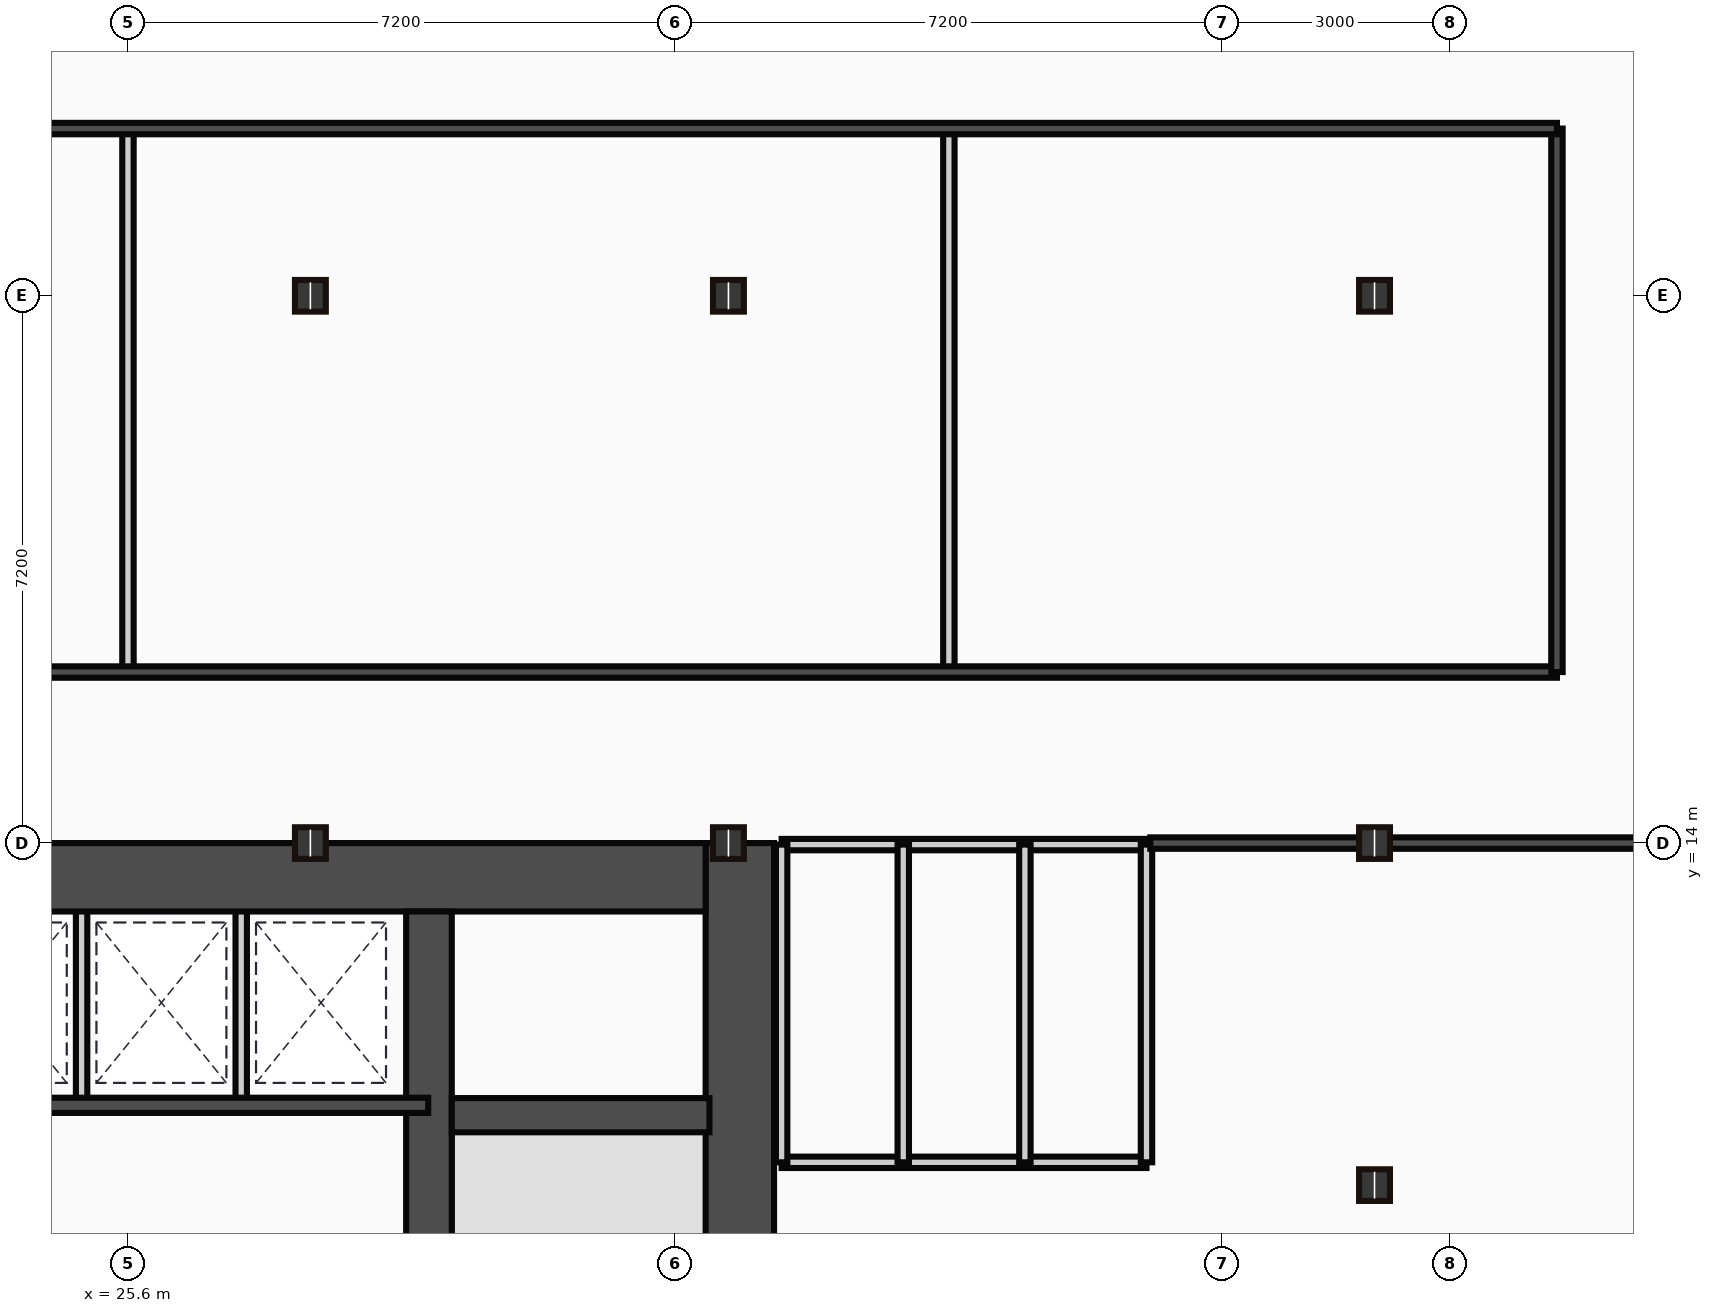
"""IFC4 building model, lengths in metres.
Left out: names, types, materials, properties, quantities, classifications, styles, units other than length and angle.
Written with IfcOpenShell. Run it as: python <this file> out.ifc"""

import sys

from ifc_helpers import new_model, si_unit, direction, frame, frame_2d, origin, origin_2d, place, context, subcontext, project, spatial, rectangle, i_section, extrude, source, transform, mapped, element, fill, save


model = new_model("IFC4")
c1 = context("Model", 3, precision=1e-05, world=origin(), true_north=direction((0.0, 1.0)))
c2 = subcontext(c1, "Body", "Model", "MODEL_VIEW")
j1 = project(units=[si_unit("LENGTHUNIT", "METRE"), si_unit("PLANEANGLEUNIT", "RADIAN")], contexts=[c1])
p1 = place(None, origin())
s1 = spatial("IfcSite", under=j1, at=p1, CompositionType="ELEMENT")
p2 = place(p1, origin())
s2 = spatial("IfcBuilding", under=s1, at=p2, CompositionType="ELEMENT")
p3 = place(p2, frame((0.0, 0.0, 32.5)))
s3 = spatial("IfcBuildingStorey", under=s2, at=p3, CompositionType="ELEMENT", Elevation=32.5)
m1 = source(origin(), c2, "Body", "SweptSolid", [
    extrude(rectangle(XDim=13.1, YDim=0.9, at=frame_2d((6.55, 0.0))), origin(), (0.0, 0.0, 1.0), 3.65),
])
p4 = place(p3, frame((33.65, 0.9, 0.0), z_axis=(0.0, 0.0, 1.0), x_axis=(0.0, 1.0, 0.0)))
e1 = element("IfcWall", 1, at=p4, inside=s3, PredefinedType="SHEAR", context=c2, shape_type="MappedRepresentation", body=[
    mapped(m1, transform((0.0, 0.0, 0.0))),
])
m2 = source(origin(), c2, "Body", "SweptSolid", [
    extrude(rectangle(XDim=12.6, YDim=0.9, at=frame_2d((6.3, 0.0))), origin(), (0.0, 0.0, 1.0), 3.65),
])
p5 = place(p3, frame((20.6, 13.55, 0.0), z_axis=(0.0, 0.0, 1.0), x_axis=(1.0, 0.0, 0.0)))
e2 = element("IfcWall", 2, at=p5, inside=s3, PredefinedType="SHEAR", context=c2, shape_type="MappedRepresentation", body=[
    mapped(m2, transform((0.0, 0.0, 0.0))),
])
p6 = place(p5, frame((9.25, 0.0, 0.0)))
e3 = element("IfcOpeningElement", 3, at=p6, cuts=e2, PredefinedType="OPENING", context=c2, shape_type="SweptSolid", body=[
    extrude(rectangle(XDim=1.1, YDim=2.15, at=frame_2d((0.55, 1.075))), frame((0.0, 0.46, 0.0), z_axis=(0.0, -1.0, 0.0), x_axis=(1.0, 0.0, 0.0)), (0.0, 0.0, 1.0), 0.92),
])
m3 = source(origin(), c2, "Body", "SweptSolid", [
    extrude(rectangle(XDim=12.2, YDim=0.6, at=frame_2d((6.1, 0.0))), origin(), (0.0, 0.0, 1.0), 3.65),
])
p7 = place(p3, frame((29.56, 0.9, 0.0), z_axis=(0.0, 0.0, 1.0), x_axis=(0.0, 1.0, 0.0)))
e4 = element("IfcWall", 4, at=p7, inside=s3, PredefinedType="SHEAR", context=c2, shape_type="MappedRepresentation", body=[
    mapped(m3, transform((0.0, 0.0, 0.0))),
])
m4 = source(origin(), c2, "Body", "SweptSolid", [
    extrude(rectangle(XDim=3.39, YDim=0.45, at=frame_2d((1.695, 0.0))), origin(), (0.0, 0.0, 1.0), 3.65),
])
p8 = place(p3, frame((29.86, 10.42, 0.0), z_axis=(0.0, 0.0, 1.0), x_axis=(1.0, 0.0, 0.0)))
e5 = element("IfcWall", 5, at=p8, inside=s3, PredefinedType="SHEAR", context=c2, shape_type="MappedRepresentation", body=[
    mapped(m4, transform((0.0, 0.0, 0.0))),
])
p9 = place(p8, frame((1.1, 0.0, 0.0)))
e6 = element("IfcOpeningElement", 6, at=p9, cuts=e5, PredefinedType="OPENING", context=c2, shape_type="SweptSolid", body=[
    extrude(rectangle(XDim=1.1, YDim=2.15, at=frame_2d((0.55, 1.075))), frame((0.0, 0.235, 0.0), z_axis=(0.0, -1.0, 0.0), x_axis=(1.0, 0.0, 0.0)), (0.0, 0.0, 1.0), 0.47),
])
m5 = source(origin(), c2, "Body", "SweptSolid", [
    extrude(i_section(OverallWidth=0.406, OverallDepth=0.416, WebThickness=0.03, FlangeThickness=0.048, at=origin_2d()), origin(), (0.0, 0.0, 1.0), 3.65),
])
for number, where, z_axis, x_axis in (
    (7, (28.0, 14.0, 0.0), (0.0, 0.0, 1.0), (1.0, 0.0, 0.0)),
    (8, (28.0, 21.2, 0.0), (0.0, 0.0, 1.0), (1.0, 0.0, 0.0)),
    (9, (33.5, 14.0, 0.0), (0.0, 0.0, 1.0), (1.0, 0.0, 0.0)),
    (10, (33.5, 21.2, 0.0), (0.0, 0.0, 1.0), (1.0, 0.0, 0.0)),
    (11, (42.0, 9.5, 0.0), (0.0, 0.0, 1.0), (1.0, 0.0, 0.0)),
    (12, (42.0, 14.0, 0.0), (0.0, 0.0, 1.0), (1.0, 0.0, 0.0)),
    (13, (42.0, 21.2, 0.0), (0.0, 0.0, 1.0), (1.0, 0.0, 0.0)),
):
    element("IfcColumn", number, at=place(p3, frame(where, z_axis=z_axis, x_axis=x_axis)), inside=s3, PredefinedType="COLUMN", context=c2, shape_type="MappedRepresentation", body=[
        mapped(m5, transform((0.0, 0.0, 0.0))),
    ])
m6 = source(origin(), c2, "Body", "SweptSolid", [
    extrude(rectangle(XDim=8.8, YDim=0.2, at=frame_2d((4.4, 0.0))), origin(), (0.0, 0.0, 1.0), 3.4),
])
p10 = place(p3, frame((20.75, 10.55, 0.0), z_axis=(0.0, 0.0, 1.0), x_axis=(1.0, 0.0, 0.0)))
e14 = element("IfcWall", 14, at=p10, inside=s3, PredefinedType="PARTITIONING", context=c2, shape_type="MappedRepresentation", body=[
    mapped(m6, transform((0.0, 0.0, 0.0))),
])
m7 = source(origin(), c2, "Body", "SweptSolid", [
    extrude(rectangle(XDim=2.85, YDim=0.15, at=frame_2d((1.425, 0.0))), origin(), (0.0, 0.0, 1.0), 3.4),
])
for number, where, z_axis, x_axis in (
    (15, (24.99, 10.6, 0.0), (0.0, 0.0, 1.0), (0.0, 1.0, 0.0)),
    (16, (27.09, 10.6, 0.0), (0.0, 0.0, 1.0), (0.0, 1.0, 0.0)),
):
    element("IfcWall", number, at=place(p3, frame(where, z_axis=z_axis, x_axis=x_axis)), inside=s3, PredefinedType="PARTITIONING", context=c2, shape_type="MappedRepresentation", body=[
        mapped(m7, transform((0.0, 0.0, 0.0))),
    ])
m8 = source(origin(), c2, "Body", "SweptSolid", [
    extrude(rectangle(XDim=4.8, YDim=0.15, at=frame_2d((2.4, 0.0))), origin(), (0.0, 0.0, 1.0), 2.625),
])
p11 = place(p3, frame((34.2, 13.98, 0.0), z_axis=(0.0, 0.0, 1.0), x_axis=(1.0, 0.0, 0.0)))
e17 = element("IfcWall", 17, at=p11, inside=s3, PredefinedType="PARTITIONING", context=c2, shape_type="MappedRepresentation", body=[
    mapped(m8, transform((0.0, 0.0, 0.0))),
])
p12 = place(p11, frame((0.35, 0.0, 0.0)))
e18 = element("IfcOpeningElement", 18, at=p12, cuts=e17, PredefinedType="OPENING", context=c2, shape_type="SweptSolid", body=[
    extrude(rectangle(XDim=0.85, YDim=2.1, at=frame_2d((0.425, 1.05))), frame((0.0, 0.085, 0.0), z_axis=(0.0, -1.0, 0.0), x_axis=(1.0, 0.0, 0.0)), (0.0, 0.0, 1.0), 0.17),
])
p13 = place(p11, frame((1.95, 0.0, 0.0)))
e19 = element("IfcOpeningElement", 19, at=p13, cuts=e17, PredefinedType="OPENING", context=c2, shape_type="SweptSolid", body=[
    extrude(rectangle(XDim=0.85, YDim=2.1, at=frame_2d((0.425, 1.05))), frame((0.0, 0.085, 0.0), z_axis=(0.0, -1.0, 0.0), x_axis=(1.0, 0.0, 0.0)), (0.0, 0.0, 1.0), 0.17),
])
p14 = place(p11, frame((3.5, 0.0, 0.0)))
e20 = element("IfcOpeningElement", 20, at=p14, cuts=e17, PredefinedType="OPENING", context=c2, shape_type="SweptSolid", body=[
    extrude(rectangle(XDim=0.9, YDim=2.1, at=frame_2d((0.45, 1.05))), frame((0.0, 0.085, 0.0), z_axis=(0.0, -1.0, 0.0), x_axis=(1.0, 0.0, 0.0)), (0.0, 0.0, 1.0), 0.17),
])
m9 = source(origin(), c2, "Body", "SweptSolid", [
    extrude(rectangle(XDim=4.8, YDim=0.15, at=frame_2d((2.4, 0.0))), origin(), (0.0, 0.0, 1.0), 3.4),
])
p15 = place(p3, frame((34.2, 9.8, 0.0), z_axis=(0.0, 0.0, 1.0), x_axis=(1.0, 0.0, 0.0)))
e21 = element("IfcWall", 21, at=p15, inside=s3, PredefinedType="PARTITIONING", context=c2, shape_type="MappedRepresentation", body=[
    mapped(m9, transform((0.0, 0.0, 0.0))),
])
m10 = source(origin(), c2, "Body", "SweptSolid", [
    extrude(rectangle(XDim=4.18, YDim=0.15, at=frame_2d((2.09, 0.0))), origin(), (0.0, 0.0, 1.0), 3.4),
])
for number, where, z_axis, x_axis in (
    (22, (39.0, 9.8, 0.0), (0.0, 0.0, 1.0), (0.0, 1.0, 0.0)),
    (23, (34.2, 9.8, 0.0), (0.0, 0.0, 1.0), (0.0, 1.0, 0.0)),
    (24, (35.8, 9.8, 0.0), (0.0, 0.0, 1.0), (0.0, 1.0, 0.0)),
    (25, (37.4, 9.8, 0.0), (0.0, 0.0, 1.0), (0.0, 1.0, 0.0)),
):
    element("IfcWall", number, at=place(p3, frame(where, z_axis=z_axis, x_axis=x_axis)), inside=s3, PredefinedType="PARTITIONING", context=c2, shape_type="MappedRepresentation", body=[
        mapped(m10, transform((0.0, 0.0, 0.0))),
    ])
m11 = source(origin(), c2, "Body", "SweptSolid", [
    extrude(rectangle(XDim=7.75, YDim=0.15, at=frame_2d((3.875, 0.0))), origin(), (0.0, 0.0, 1.0), 2.625),
])
p16 = place(p3, frame((46.8, 14.0, 0.0), z_axis=(0.0, 0.0, 1.0), x_axis=(-1.0, 0.0, 0.0)))
e26 = element("IfcWall", 26, at=p16, inside=s3, PredefinedType="PARTITIONING", context=c2, shape_type="MappedRepresentation", body=[
    mapped(m11, transform((0.0, 0.0, 0.0))),
])
p17 = place(p16, frame((2.226, 0.0, 0.0)))
e27 = element("IfcOpeningElement", 27, at=p17, cuts=e26, PredefinedType="OPENING", context=c2, shape_type="SweptSolid", body=[
    extrude(rectangle(XDim=0.95, YDim=2.15, at=frame_2d((0.475, 1.075))), frame((0.0, 0.085, 0.0), z_axis=(0.0, -1.0, 0.0), x_axis=(1.0, 0.0, 0.0)), (0.0, 0.0, 1.0), 0.17),
])
m12 = source(origin(), c2, "Body", "SweptSolid", [
    extrude(rectangle(XDim=38.8, YDim=0.15, at=frame_2d((19.4, 0.0))), origin(), (0.0, 0.0, 1.0), 3.4),
])
p18 = place(p3, frame((5.6, 16.25, 0.0), z_axis=(0.0, 0.0, 1.0), x_axis=(1.0, 0.0, 0.0)))
e28 = element("IfcWall", 28, at=p18, inside=s3, PredefinedType="PARTITIONING", context=c2, shape_type="MappedRepresentation", body=[
    mapped(m12, transform((0.0, 0.0, 0.0))),
])
p19 = place(p18, frame((4.255, 0.0, 0.0)))
e29 = element("IfcOpeningElement", 29, at=p19, cuts=e28, PredefinedType="OPENING", context=c2, shape_type="SweptSolid", body=[
    extrude(rectangle(XDim=0.95, YDim=2.15, at=frame_2d((0.475, 1.075))), frame((0.0, 0.085, 0.0), z_axis=(0.0, -1.0, 0.0), x_axis=(1.0, 0.0, 0.0)), (0.0, 0.0, 1.0), 0.17),
])
p20 = place(p18, frame((14.125, 0.0, 0.0)))
e30 = element("IfcOpeningElement", 30, at=p20, cuts=e28, PredefinedType="OPENING", context=c2, shape_type="SweptSolid", body=[
    extrude(rectangle(XDim=0.95, YDim=2.15, at=frame_2d((0.475, 1.075))), frame((0.0, 0.085, 0.0), z_axis=(0.0, -1.0, 0.0), x_axis=(1.0, 0.0, 0.0)), (0.0, 0.0, 1.0), 0.17),
])
m13 = source(origin(), c2, "Body", "SweptSolid", [
    extrude(rectangle(XDim=7.15, YDim=0.15, at=frame_2d((3.575, 0.0))), origin(), (0.0, 0.0, 1.0), 3.4),
])
p21 = place(p3, frame((44.4, 16.25, 0.0), z_axis=(0.0, 0.0, 1.0), x_axis=(0.0, 1.0, 0.0)))
e31 = element("IfcWall", 31, at=p21, inside=s3, PredefinedType="PARTITIONING", context=c2, shape_type="MappedRepresentation", body=[
    mapped(m13, transform((0.0, 0.0, 0.0))),
])
m14 = source(origin(), c2, "Body", "SweptSolid", [
    extrude(rectangle(XDim=38.8, YDim=0.15, at=frame_2d((19.4, 0.0))), origin(), (0.0, 0.0, 1.0), 2.978),
])
p22 = place(p3, frame((44.4, 23.4, 0.0), z_axis=(0.0, 0.0, 1.0), x_axis=(-1.0, 0.0, 0.0)))
e32 = element("IfcWall", 32, at=p22, inside=s3, PredefinedType="PARTITIONING", context=c2, shape_type="MappedRepresentation", body=[
    mapped(m14, transform((0.0, 0.0, 0.0))),
])
p23 = place(p22, frame((12.925, 0.0, 0.0)))
e33 = element("IfcOpeningElement", 33, at=p23, cuts=e32, PredefinedType="OPENING", context=c2, shape_type="SweptSolid", body=[
    extrude(rectangle(XDim=0.95, YDim=2.15, at=frame_2d((0.475, 1.075))), frame((0.0, 0.085, 0.0), z_axis=(0.0, -1.0, 0.0), x_axis=(1.0, 0.0, 0.0)), (0.0, 0.0, 1.0), 0.17),
])
p24 = place(p22, frame((3.655, 0.0, 0.0)))
e34 = element("IfcOpeningElement", 34, at=p24, cuts=e32, PredefinedType="OPENING", context=c2, shape_type="SweptSolid", body=[
    extrude(rectangle(XDim=0.95, YDim=2.15, at=frame_2d((0.475, 1.075))), frame((0.0, 0.085, 0.0), z_axis=(0.0, -1.0, 0.0), x_axis=(1.0, 0.0, 0.0)), (0.0, 0.0, 1.0), 0.17),
])
for number, where, z_axis, x_axis in (
    (35, (25.6, 23.4, 0.0), (0.0, 0.0, 1.0), (0.0, -1.0, 0.0)),
    (36, (36.4, 23.4, 0.0), (0.0, 0.0, 1.0), (0.0, -1.0, 0.0)),
):
    element("IfcWall", number, at=place(p3, frame(where, z_axis=z_axis, x_axis=x_axis)), inside=s3, PredefinedType="PARTITIONING", context=c2, shape_type="MappedRepresentation", body=[
        mapped(m13, transform((0.0, 0.0, 0.0))),
    ])
m15 = source(origin(), c2, "Body", "SweptSolid", [
    extrude(rectangle(XDim=1.1, YDim=2.15, at=frame_2d((0.55, 1.075))), frame((0.0, 0.025, 0.0), z_axis=(0.0, -1.0, 0.0), x_axis=(1.0, 0.0, 0.0)), (0.0, 0.0, 1.0), 0.05),
])
p25 = place(p9, frame((1.1, 0.0, 0.0), z_axis=(0.0, 0.0, 1.0), x_axis=(-1.0, 0.0, 0.0)))
e37 = element("IfcDoor", 37, at=p25, inside=s3, OperationType="SINGLE_SWING_RIGHT", PredefinedType="DOOR", context=c2, shape_type="MappedRepresentation", body=[
    mapped(m15, transform((0.0, 0.0, 0.0))),
])
fill(e6, e37)
p26 = place(p6, origin())
e38 = element("IfcDoor", 38, at=p26, inside=s3, OperationType="SINGLE_SWING_LEFT", PredefinedType="DOOR", context=c2, shape_type="MappedRepresentation", body=[
    mapped(m15, transform((0.0, 0.0, 0.0))),
])
fill(e3, e38)
m16 = source(origin(), c2, "Body", "SweptSolid", [
    extrude(rectangle(XDim=0.85, YDim=2.1, at=frame_2d((0.425, 1.05))), frame((0.0, 0.025, 0.0), z_axis=(0.0, -1.0, 0.0), x_axis=(1.0, 0.0, 0.0)), (0.0, 0.0, 1.0), 0.05),
])
p27 = place(p12, frame((0.85, 0.0, 0.0), z_axis=(0.0, 0.0, 1.0), x_axis=(-1.0, 0.0, 0.0)))
e39 = element("IfcDoor", 39, at=p27, inside=s3, OperationType="SINGLE_SWING_LEFT", PredefinedType="DOOR", context=c2, shape_type="MappedRepresentation", body=[
    mapped(m16, transform((0.0, 0.0, 0.0))),
])
fill(e18, e39)
p28 = place(p13, frame((0.85, 0.0, 0.0), z_axis=(0.0, 0.0, 1.0), x_axis=(-1.0, 0.0, 0.0)))
e40 = element("IfcDoor", 40, at=p28, inside=s3, OperationType="SINGLE_SWING_RIGHT", PredefinedType="DOOR", context=c2, shape_type="MappedRepresentation", body=[
    mapped(m16, transform((0.0, 0.0, 0.0))),
])
fill(e19, e40)
m17 = source(origin(), c2, "Body", "SweptSolid", [
    extrude(rectangle(XDim=0.9, YDim=2.1, at=frame_2d((0.45, 1.05))), frame((0.0, 0.025, 0.0), z_axis=(0.0, -1.0, 0.0), x_axis=(1.0, 0.0, 0.0)), (0.0, 0.0, 1.0), 0.05),
])
p29 = place(p14, frame((0.9, 0.0, 0.0), z_axis=(0.0, 0.0, 1.0), x_axis=(-1.0, 0.0, 0.0)))
e41 = element("IfcDoor", 41, at=p29, inside=s3, OperationType="SINGLE_SWING_LEFT", PredefinedType="DOOR", context=c2, shape_type="MappedRepresentation", body=[
    mapped(m17, transform((0.0, 0.0, 0.0))),
])
fill(e20, e41)
m18 = source(origin(), c2, "Body", "SweptSolid", [
    extrude(rectangle(XDim=0.95, YDim=2.15, at=frame_2d((0.475, 1.075))), frame((0.0, 0.025, 0.0), z_axis=(0.0, -1.0, 0.0), x_axis=(1.0, 0.0, 0.0)), (0.0, 0.0, 1.0), 0.05),
])
p30 = place(p23, origin())
e42 = element("IfcDoor", 42, at=p30, inside=s3, OperationType="SINGLE_SWING_RIGHT", PredefinedType="DOOR", context=c2, shape_type="MappedRepresentation", body=[
    mapped(m18, transform((0.0, 0.0, 0.0))),
])
fill(e33, e42)
p31 = place(p24, origin())
e43 = element("IfcDoor", 43, at=p31, inside=s3, OperationType="SINGLE_SWING_RIGHT", PredefinedType="DOOR", context=c2, shape_type="MappedRepresentation", body=[
    mapped(m18, transform((0.0, 0.0, 0.0))),
])
fill(e34, e43)
p32 = place(p17, origin())
e44 = element("IfcDoor", 44, at=p32, inside=s3, OperationType="SINGLE_SWING_RIGHT", PredefinedType="DOOR", context=c2, shape_type="MappedRepresentation", body=[
    mapped(m18, transform((0.0, 0.0, 0.0))),
])
fill(e27, e44)
save(model, sys.argv[1])
